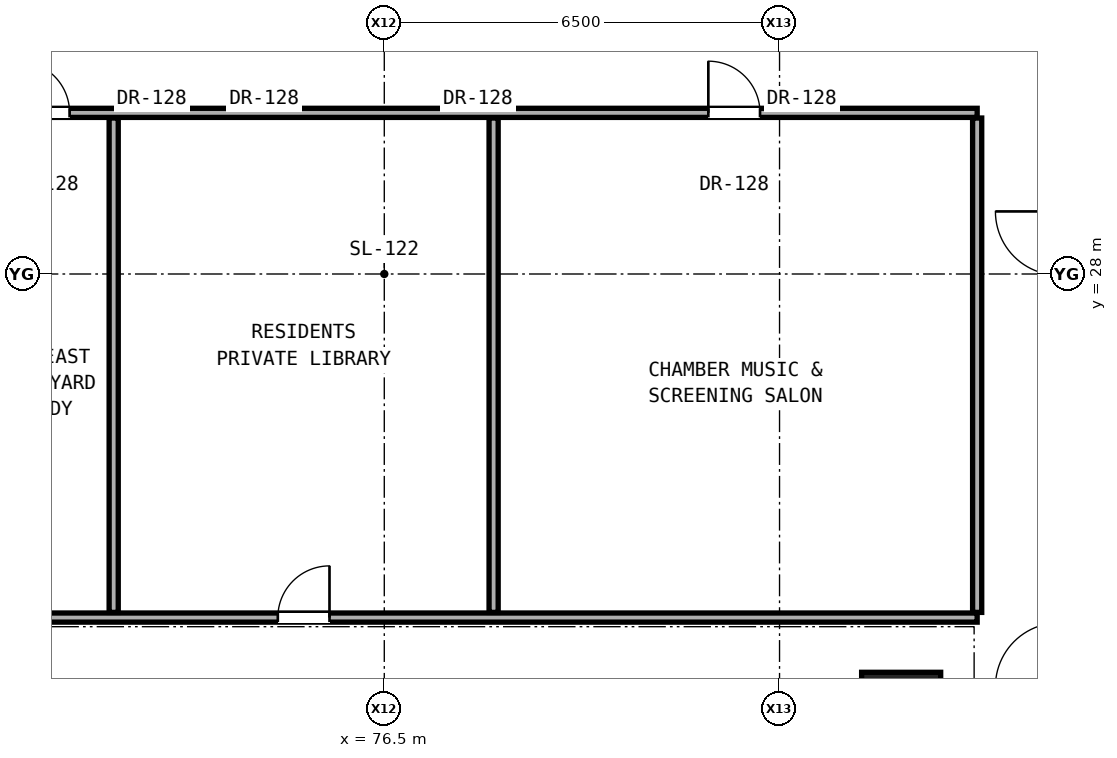
"""IFC4 building model, lengths in metres.
Left out: names, types, materials, properties, quantities, classifications, styles, units other than length and angle.
Written with IfcOpenShell. Run it as: python <this file> out.ifc"""

import sys

from ifc_helpers import new_model, si_unit, direction, frame, frame_2d, origin, origin_2d, place, context, subcontext, project, spatial, rectangle, extrude, element, fill, save


model = new_model("IFC4")
c1 = context("Model", 3, precision=1e-05, world=origin(), true_north=direction((0.0, 1.0)))
c2 = subcontext(c1, "Body", "Model", "MODEL_VIEW")
j1 = project(units=[si_unit("LENGTHUNIT", "METRE"), si_unit("PLANEANGLEUNIT", "RADIAN")], contexts=[c1])
p1 = place(None, origin())
s1 = spatial("IfcSite", under=j1, at=p1, CompositionType="ELEMENT")
p2 = place(p1, origin())
s2 = spatial("IfcBuilding", under=s1, at=p2, CompositionType="ELEMENT")
p3 = place(p2, frame((0.0, 0.0, 52.1)))
s3 = spatial("IfcBuildingStorey", under=s2, at=p3, CompositionType="ELEMENT", Elevation=52.1)
p4 = place(p3, frame((85.0, 20.8, 0.0), z_axis=(0.0, 0.0, 1.0), x_axis=(1.0, 0.0, 0.0)))
e1 = element("IfcColumn", 1, at=p4, inside=s3, PredefinedType="COLUMN", context=c2, shape_type="SweptSolid", body=[
    extrude(rectangle(XDim=1.3, YDim=1.3, at=origin_2d()), origin(), (0.0, 0.0, 1.0), 3.3),
])
p5 = place(p3, frame((66.62, 22.35, 0.0), z_axis=(0.0, 0.0, 1.0), x_axis=(1.0, 0.0, 0.0)))
e2 = element("IfcWall", 2, at=p5, inside=s3, PredefinedType="PARTITIONING", context=c2, shape_type="SweptSolid", body=[
    extrude(rectangle(XDim=19.63, YDim=0.15, at=frame_2d((9.815, 0.0))), origin(), (0.0, 0.0, 1.0), 2.125),
])
p6 = place(p5, frame((8.129, 0.0, 0.0)))
e3 = element("IfcOpeningElement", 3, at=p6, cuts=e2, PredefinedType="OPENING", context=c2, shape_type="SweptSolid", body=[
    extrude(rectangle(XDim=0.85, YDim=2.01, at=frame_2d((0.425, 1.005))), frame((0.0, 0.085, 0.0), z_axis=(0.0, -1.0, 0.0), x_axis=(1.0, 0.0, 0.0)), (0.0, 0.0, 1.0), 0.17),
])
p7 = place(p3, frame((66.62, 30.65, 0.0), z_axis=(0.0, 0.0, 1.0), x_axis=(1.0, 0.0, 0.0)))
e4 = element("IfcWall", 4, at=p7, inside=s3, PredefinedType="PARTITIONING", context=c2, shape_type="SweptSolid", body=[
    extrude(rectangle(XDim=19.63, YDim=0.15, at=frame_2d((9.815, 0.0))), origin(), (0.0, 0.0, 1.0), 2.125),
])
p8 = place(p7, frame((3.855, 0.0, 0.0)))
e5 = element("IfcOpeningElement", 5, at=p8, cuts=e4, PredefinedType="OPENING", context=c2, shape_type="SweptSolid", body=[
    extrude(rectangle(XDim=0.85, YDim=2.01, at=frame_2d((0.425, 1.005))), frame((0.0, 0.085, 0.0), z_axis=(0.0, -1.0, 0.0), x_axis=(1.0, 0.0, 0.0)), (0.0, 0.0, 1.0), 0.17),
])
p9 = place(p7, frame((15.209, 0.0, 0.0)))
e6 = element("IfcOpeningElement", 6, at=p9, cuts=e4, PredefinedType="OPENING", context=c2, shape_type="SweptSolid", body=[
    extrude(rectangle(XDim=0.85, YDim=2.01, at=frame_2d((0.425, 1.005))), frame((0.0, 0.085, 0.0), z_axis=(0.0, -1.0, 0.0), x_axis=(1.0, 0.0, 0.0)), (0.0, 0.0, 1.0), 0.17),
])
for number, where, z_axis, x_axis in (
    (7, (72.05, 22.435, 0.0), (0.0, 0.0, 1.0), (0.0, 1.0, 0.0)),
    (8, (78.298, 22.435, 0.0), (0.0, 0.0, 1.0), (0.0, 1.0, 0.0)),
):
    element("IfcWall", number, at=place(p3, frame(where, z_axis=z_axis, x_axis=x_axis)), inside=s3, PredefinedType="PARTITIONING", context=c2, shape_type="SweptSolid", body=[
        extrude(rectangle(XDim=8.13, YDim=0.15, at=frame_2d((4.065, 0.0))), origin(), (0.0, 0.0, 1.0), 2.125),
    ])
p10 = place(p3, frame((86.25, 22.435, 0.0), z_axis=(0.0, 0.0, 1.0), x_axis=(0.0, 1.0, 0.0)))
e9 = element("IfcWall", 9, at=p10, inside=s3, PredefinedType="PARTITIONING", context=c2, shape_type="SweptSolid", body=[
    extrude(rectangle(XDim=8.13, YDim=0.15, at=frame_2d((4.065, 0.0))), origin(), (0.0, 0.0, 1.0), 2.279),
])
p11 = place(p8, origin())
e10 = element("IfcDoor", 10, at=p11, inside=s3, OperationType="SINGLE_SWING_LEFT", PredefinedType="DOOR", context=c2, shape_type="SweptSolid", body=[
    extrude(rectangle(XDim=0.85, YDim=2.01, at=frame_2d((0.425, 1.005))), frame((0.0, 0.025, 0.0), z_axis=(0.0, -1.0, 0.0), x_axis=(1.0, 0.0, 0.0)), (0.0, 0.0, 1.0), 0.05),
])
fill(e5, e10)
p12 = place(p6, origin())
e11 = element("IfcDoor", 11, at=p12, inside=s3, OperationType="SINGLE_SWING_RIGHT", PredefinedType="DOOR", context=c2, shape_type="SweptSolid", body=[
    extrude(rectangle(XDim=0.85, YDim=2.01, at=frame_2d((0.425, 1.005))), frame((0.0, 0.025, 0.0), z_axis=(0.0, -1.0, 0.0), x_axis=(1.0, 0.0, 0.0)), (0.0, 0.0, 1.0), 0.05),
])
fill(e3, e11)
p13 = place(p9, origin())
e12 = element("IfcDoor", 12, at=p13, inside=s3, OperationType="SINGLE_SWING_LEFT", PredefinedType="DOOR", context=c2, shape_type="SweptSolid", body=[
    extrude(rectangle(XDim=0.85, YDim=2.01, at=frame_2d((0.425, 1.005))), frame((0.0, 0.025, 0.0), z_axis=(0.0, -1.0, 0.0), x_axis=(1.0, 0.0, 0.0)), (0.0, 0.0, 1.0), 0.05),
])
fill(e6, e12)
save(model, sys.argv[1])
